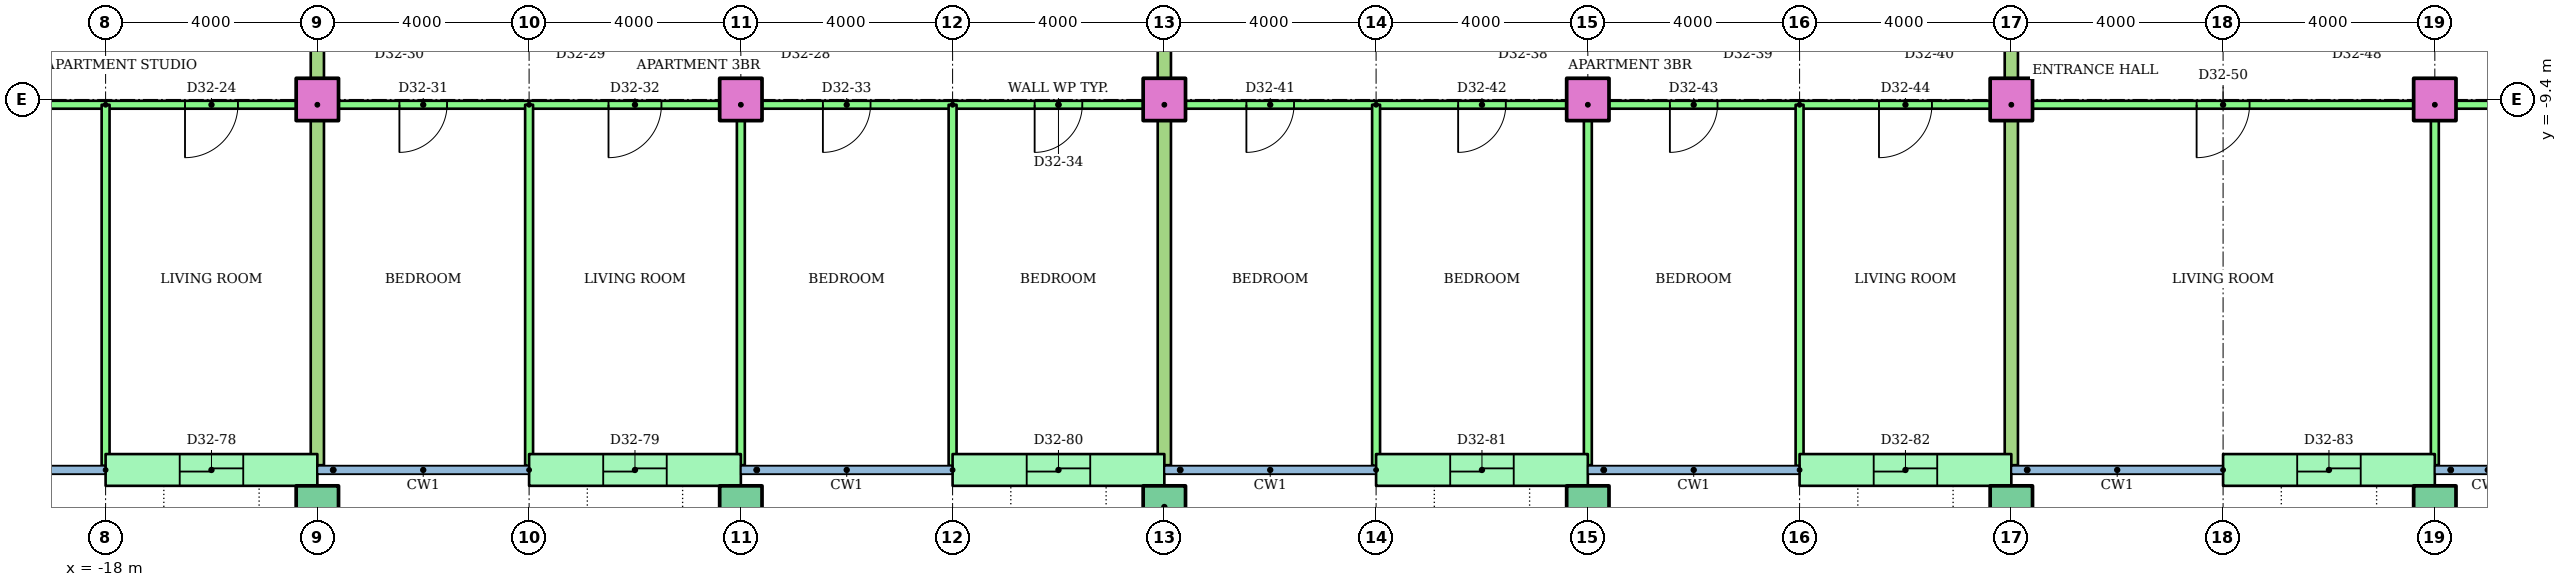
"""IFC4 building model, lengths in metres.
Left out: names, types, materials, properties, quantities, classifications, styles, units other than length and angle.
Written with IfcOpenShell. Run it as: python <this file> out.ifc"""

import sys

from ifc_helpers import new_model, si_unit, direction, frame, frame_2d, origin, origin_2d, place, context, subcontext, project, spatial, rectangle, hollow_rectangle, extrude, element, fill, save


model = new_model("IFC4")
c1 = context("Model", 3, precision=1e-05, world=origin(), true_north=direction((0.0, 1.0)))
c2 = subcontext(c1, "Body", "Model", "MODEL_VIEW")
j1 = project(units=[si_unit("LENGTHUNIT", "METRE"), si_unit("PLANEANGLEUNIT", "RADIAN")], contexts=[c1])
p1 = place(None, origin())
s1 = spatial("IfcSite", under=j1, at=p1, CompositionType="ELEMENT")
p2 = place(p1, origin())
s2 = spatial("IfcBuilding", under=s1, at=p2, CompositionType="ELEMENT")
p3 = place(p2, frame((0.0, 0.0, 126.2)))
s3 = spatial("IfcBuildingStorey", under=s2, at=p3, CompositionType="ELEMENT", Elevation=126.2)
for number, where in (
    (1, (-14.0, -17.1, 0.0)),
    (2, (-6.0, -17.1, 0.0)),
    (3, (2.0, -17.1, 0.0)),
    (4, (10.0, -17.1, 0.0)),
    (5, (18.0, -17.1, 0.0)),
    (6, (26.0, -17.1, 0.0)),
):
    element("IfcColumn", number, at=place(p3, frame(where)), inside=s3, PredefinedType="COLUMN", context=c2, shape_type="SweptSolid", body=[
        extrude(hollow_rectangle(XDim=0.8, YDim=0.8, WallThickness=0.04, at=origin_2d()), origin(), (0.0, 0.0, 1.0), 3.2),
    ])
for number, where in (
    (7, (-14.0, -9.4, 0.0)),
    (8, (-6.0, -9.4, 0.0)),
    (9, (2.0, -9.4, 0.0)),
    (10, (10.0, -9.4, 0.0)),
    (11, (18.0, -9.4, 0.0)),
    (12, (26.0, -9.4, 0.0)),
):
    element("IfcColumn", number, at=place(p3, frame(where)), inside=s3, PredefinedType="COLUMN", context=c2, shape_type="SweptSolid", body=[
        extrude(rectangle(XDim=0.8, YDim=0.8, at=origin_2d()), origin(), (0.0, 0.0, 1.0), 3.2),
    ])
p4 = place(p3, frame((-18.0, -16.4, 0.0)))
e13 = element("IfcWall", 13, at=p4, inside=s3, PredefinedType="STANDARD", context=c2, shape_type="SweptSolid", body=[
    extrude(rectangle(XDim=4.0, YDim=0.6, at=frame_2d((2.0, 0.0))), origin(), (0.0, 0.0, 1.0), 2.92),
])
p5 = place(p4, frame((1.4, 0.0, 0.0)))
e14 = element("IfcOpeningElement", 14, at=p5, cuts=e13, PredefinedType="OPENING", context=c2, shape_type="SweptSolid", body=[
    extrude(rectangle(XDim=1.2, YDim=2.1, at=frame_2d((0.6, 1.05))), frame((0.0, 0.31, 0.0), z_axis=(0.0, -1.0, 0.0), x_axis=(1.0, 0.0, 0.0)), (0.0, 0.0, 1.0), 0.62),
])
p6 = place(p3, frame((-10.0, -16.4, 0.0)))
e15 = element("IfcWall", 15, at=p6, inside=s3, PredefinedType="STANDARD", context=c2, shape_type="SweptSolid", body=[
    extrude(rectangle(XDim=4.0, YDim=0.6, at=frame_2d((2.0, 0.0))), origin(), (0.0, 0.0, 1.0), 2.92),
])
p7 = place(p6, frame((1.4, 0.0, 0.0)))
e16 = element("IfcOpeningElement", 16, at=p7, cuts=e15, PredefinedType="OPENING", context=c2, shape_type="SweptSolid", body=[
    extrude(rectangle(XDim=1.2, YDim=2.1, at=frame_2d((0.6, 1.05))), frame((0.0, 0.31, 0.0), z_axis=(0.0, -1.0, 0.0), x_axis=(1.0, 0.0, 0.0)), (0.0, 0.0, 1.0), 0.62),
])
p8 = place(p3, frame((-2.0, -16.4, 0.0)))
e17 = element("IfcWall", 17, at=p8, inside=s3, PredefinedType="STANDARD", context=c2, shape_type="SweptSolid", body=[
    extrude(rectangle(XDim=4.0, YDim=0.6, at=frame_2d((2.0, 0.0))), origin(), (0.0, 0.0, 1.0), 2.92),
])
p9 = place(p8, frame((1.4, 0.0, 0.0)))
e18 = element("IfcOpeningElement", 18, at=p9, cuts=e17, PredefinedType="OPENING", context=c2, shape_type="SweptSolid", body=[
    extrude(rectangle(XDim=1.2, YDim=2.1, at=frame_2d((0.6, 1.05))), frame((0.0, 0.31, 0.0), z_axis=(0.0, -1.0, 0.0), x_axis=(1.0, 0.0, 0.0)), (0.0, 0.0, 1.0), 0.62),
])
p10 = place(p3, frame((6.0, -16.4, 0.0)))
e19 = element("IfcWall", 19, at=p10, inside=s3, PredefinedType="STANDARD", context=c2, shape_type="SweptSolid", body=[
    extrude(rectangle(XDim=4.0, YDim=0.6, at=frame_2d((2.0, 0.0))), origin(), (0.0, 0.0, 1.0), 2.92),
])
p11 = place(p10, frame((1.4, 0.0, 0.0)))
e20 = element("IfcOpeningElement", 20, at=p11, cuts=e19, PredefinedType="OPENING", context=c2, shape_type="SweptSolid", body=[
    extrude(rectangle(XDim=1.2, YDim=2.1, at=frame_2d((0.6, 1.05))), frame((0.0, 0.31, 0.0), z_axis=(0.0, -1.0, 0.0), x_axis=(1.0, 0.0, 0.0)), (0.0, 0.0, 1.0), 0.62),
])
p12 = place(p3, frame((14.0, -16.4, 0.0)))
e21 = element("IfcWall", 21, at=p12, inside=s3, PredefinedType="STANDARD", context=c2, shape_type="SweptSolid", body=[
    extrude(rectangle(XDim=4.0, YDim=0.6, at=frame_2d((2.0, 0.0))), origin(), (0.0, 0.0, 1.0), 2.92),
])
p13 = place(p12, frame((1.4, 0.0, 0.0)))
e22 = element("IfcOpeningElement", 22, at=p13, cuts=e21, PredefinedType="OPENING", context=c2, shape_type="SweptSolid", body=[
    extrude(rectangle(XDim=1.2, YDim=2.1, at=frame_2d((0.6, 1.05))), frame((0.0, 0.31, 0.0), z_axis=(0.0, -1.0, 0.0), x_axis=(1.0, 0.0, 0.0)), (0.0, 0.0, 1.0), 0.62),
])
p14 = place(p3, frame((22.0, -16.4, 0.0)))
e23 = element("IfcWall", 23, at=p14, inside=s3, PredefinedType="STANDARD", context=c2, shape_type="SweptSolid", body=[
    extrude(rectangle(XDim=4.0, YDim=0.6, at=frame_2d((2.0, 0.0))), origin(), (0.0, 0.0, 1.0), 2.92),
])
p15 = place(p14, frame((1.4, 0.0, 0.0)))
e24 = element("IfcOpeningElement", 24, at=p15, cuts=e23, PredefinedType="OPENING", context=c2, shape_type="SweptSolid", body=[
    extrude(rectangle(XDim=1.2, YDim=2.1, at=frame_2d((0.6, 1.05))), frame((0.0, 0.31, 0.0), z_axis=(0.0, -1.0, 0.0), x_axis=(1.0, 0.0, 0.0)), (0.0, 0.0, 1.0), 0.62),
])
p16 = place(p3, frame((-14.0, -9.5, 0.0), z_axis=(0.0, 0.0, 1.0), x_axis=(-1.0, 0.0, 0.0)))
e25 = element("IfcWall", 25, at=p16, inside=s3, PredefinedType="PARTITIONING", context=c2, shape_type="SweptSolid", body=[
    extrude(rectangle(XDim=8.0, YDim=0.15, at=frame_2d((4.0, 0.0))), origin(), (0.0, 0.0, 1.0), 2.4),
])
p17 = place(p16, frame((5.5, 0.0, 0.0)))
e26 = element("IfcOpeningElement", 26, at=p17, cuts=e25, PredefinedType="OPENING", context=c2, shape_type="SweptSolid", body=[
    extrude(rectangle(XDim=1.0, YDim=2.1, at=frame_2d((0.5, 1.05))), frame((0.0, 0.085, 0.0), z_axis=(0.0, -1.0, 0.0), x_axis=(1.0, 0.0, 0.0)), (0.0, 0.0, 1.0), 0.17),
])
p18 = place(p16, frame((1.5, 0.0, 0.0)))
e27 = element("IfcOpeningElement", 27, at=p18, cuts=e25, PredefinedType="OPENING", context=c2, shape_type="SweptSolid", body=[
    extrude(rectangle(XDim=1.0, YDim=2.1, at=frame_2d((0.5, 1.05))), frame((0.0, 0.085, 0.0), z_axis=(0.0, -1.0, 0.0), x_axis=(1.0, 0.0, 0.0)), (0.0, 0.0, 1.0), 0.17),
])
p19 = place(p3, frame((-18.0, -9.5, 0.0), z_axis=(0.0, 0.0, 1.0), x_axis=(0.0, -1.0, 0.0)))
e28 = element("IfcWall", 28, at=p19, inside=s3, PredefinedType="PARTITIONING", context=c2, shape_type="SweptSolid", body=[
    extrude(rectangle(XDim=6.821, YDim=0.15, at=frame_2d((3.411, 0.0))), origin(), (0.0, 0.0, 1.0), 2.4),
])
p20 = place(p3, frame((2.0, -9.5, 0.0), z_axis=(0.0, 0.0, 1.0), x_axis=(-1.0, 0.0, 0.0)))
e29 = element("IfcWall", 29, at=p20, inside=s3, PredefinedType="PARTITIONING", context=c2, shape_type="SweptSolid", body=[
    extrude(rectangle(XDim=16.0, YDim=0.15, at=frame_2d((8.0, 0.0))), origin(), (0.0, 0.0, 1.0), 2.4),
])
p21 = place(p20, frame((13.55, 0.0, 0.0)))
e30 = element("IfcOpeningElement", 30, at=p21, cuts=e29, PredefinedType="OPENING", context=c2, shape_type="SweptSolid", body=[
    extrude(rectangle(XDim=0.9, YDim=2.1, at=frame_2d((0.45, 1.05))), frame((0.0, 0.085, 0.0), z_axis=(0.0, -1.0, 0.0), x_axis=(1.0, 0.0, 0.0)), (0.0, 0.0, 1.0), 0.17),
])
p22 = place(p20, frame((9.5, 0.0, 0.0)))
e31 = element("IfcOpeningElement", 31, at=p22, cuts=e29, PredefinedType="OPENING", context=c2, shape_type="SweptSolid", body=[
    extrude(rectangle(XDim=1.0, YDim=2.1, at=frame_2d((0.5, 1.05))), frame((0.0, 0.085, 0.0), z_axis=(0.0, -1.0, 0.0), x_axis=(1.0, 0.0, 0.0)), (0.0, 0.0, 1.0), 0.17),
])
p23 = place(p20, frame((5.55, 0.0, 0.0)))
e32 = element("IfcOpeningElement", 32, at=p23, cuts=e29, PredefinedType="OPENING", context=c2, shape_type="SweptSolid", body=[
    extrude(rectangle(XDim=0.9, YDim=2.1, at=frame_2d((0.45, 1.05))), frame((0.0, 0.085, 0.0), z_axis=(0.0, -1.0, 0.0), x_axis=(1.0, 0.0, 0.0)), (0.0, 0.0, 1.0), 0.17),
])
p24 = place(p20, frame((1.55, 0.0, 0.0)))
e33 = element("IfcOpeningElement", 33, at=p24, cuts=e29, PredefinedType="OPENING", context=c2, shape_type="SweptSolid", body=[
    extrude(rectangle(XDim=0.9, YDim=2.1, at=frame_2d((0.45, 1.05))), frame((0.0, 0.085, 0.0), z_axis=(0.0, -1.0, 0.0), x_axis=(1.0, 0.0, 0.0)), (0.0, 0.0, 1.0), 0.17),
])
p25 = place(p3, frame((-10.0, -9.5, 0.0), z_axis=(0.0, 0.0, 1.0), x_axis=(0.0, -1.0, 0.0)))
e34 = element("IfcWall", 34, at=p25, inside=s3, PredefinedType="PARTITIONING", context=c2, shape_type="SweptSolid", body=[
    extrude(rectangle(XDim=6.821, YDim=0.15, at=frame_2d((3.411, 0.0))), origin(), (0.0, 0.0, 1.0), 2.4),
])
p26 = place(p3, frame((-6.0, -9.5, 0.0), z_axis=(0.0, 0.0, 1.0), x_axis=(0.0, -1.0, 0.0)))
e35 = element("IfcWall", 35, at=p26, inside=s3, PredefinedType="PARTITIONING", context=c2, shape_type="SweptSolid", body=[
    extrude(rectangle(XDim=6.81, YDim=0.15, at=frame_2d((3.405, 0.0))), origin(), (0.0, 0.0, 1.0), 2.4),
])
p27 = place(p3, frame((-2.0, -9.5, 0.0), z_axis=(0.0, 0.0, 1.0), x_axis=(0.0, -1.0, 0.0)))
e36 = element("IfcWall", 36, at=p27, inside=s3, PredefinedType="PARTITIONING", context=c2, shape_type="SweptSolid", body=[
    extrude(rectangle(XDim=6.821, YDim=0.15, at=frame_2d((3.411, 0.0))), origin(), (0.0, 0.0, 1.0), 2.4),
])
p28 = place(p3, frame((-14.0, -1.4, 0.0), z_axis=(0.0, 0.0, 1.0), x_axis=(0.0, -1.0, 0.0)))
e37 = element("IfcWall", 37, at=p28, inside=s3, PredefinedType="PARTITIONING", context=c2, shape_type="SweptSolid", body=[
    extrude(rectangle(XDim=14.91, YDim=0.25, at=frame_2d((7.455, 0.0))), origin(), (0.0, 0.0, 1.0), 2.4),
])
p29 = place(p3, frame((18.0, -9.5, 0.0), z_axis=(0.0, 0.0, 1.0), x_axis=(-1.0, 0.0, 0.0)))
e38 = element("IfcWall", 38, at=p29, inside=s3, PredefinedType="PARTITIONING", context=c2, shape_type="SweptSolid", body=[
    extrude(rectangle(XDim=16.0, YDim=0.15, at=frame_2d((8.0, 0.0))), origin(), (0.0, 0.0, 1.0), 2.4),
])
p30 = place(p29, frame((13.55, 0.0, 0.0)))
e39 = element("IfcOpeningElement", 39, at=p30, cuts=e38, PredefinedType="OPENING", context=c2, shape_type="SweptSolid", body=[
    extrude(rectangle(XDim=0.9, YDim=2.1, at=frame_2d((0.45, 1.05))), frame((0.0, 0.085, 0.0), z_axis=(0.0, -1.0, 0.0), x_axis=(1.0, 0.0, 0.0)), (0.0, 0.0, 1.0), 0.17),
])
p31 = place(p29, frame((9.55, 0.0, 0.0)))
e40 = element("IfcOpeningElement", 40, at=p31, cuts=e38, PredefinedType="OPENING", context=c2, shape_type="SweptSolid", body=[
    extrude(rectangle(XDim=0.9, YDim=2.1, at=frame_2d((0.45, 1.05))), frame((0.0, 0.085, 0.0), z_axis=(0.0, -1.0, 0.0), x_axis=(1.0, 0.0, 0.0)), (0.0, 0.0, 1.0), 0.17),
])
p32 = place(p29, frame((5.55, 0.0, 0.0)))
e41 = element("IfcOpeningElement", 41, at=p32, cuts=e38, PredefinedType="OPENING", context=c2, shape_type="SweptSolid", body=[
    extrude(rectangle(XDim=0.9, YDim=2.1, at=frame_2d((0.45, 1.05))), frame((0.0, 0.085, 0.0), z_axis=(0.0, -1.0, 0.0), x_axis=(1.0, 0.0, 0.0)), (0.0, 0.0, 1.0), 0.17),
])
p33 = place(p29, frame((1.5, 0.0, 0.0)))
e42 = element("IfcOpeningElement", 42, at=p33, cuts=e38, PredefinedType="OPENING", context=c2, shape_type="SweptSolid", body=[
    extrude(rectangle(XDim=1.0, YDim=2.1, at=frame_2d((0.5, 1.05))), frame((0.0, 0.085, 0.0), z_axis=(0.0, -1.0, 0.0), x_axis=(1.0, 0.0, 0.0)), (0.0, 0.0, 1.0), 0.17),
])
p34 = place(p3, frame((6.0, -9.5, 0.0), z_axis=(0.0, 0.0, 1.0), x_axis=(0.0, -1.0, 0.0)))
e43 = element("IfcWall", 43, at=p34, inside=s3, PredefinedType="PARTITIONING", context=c2, shape_type="SweptSolid", body=[
    extrude(rectangle(XDim=6.821, YDim=0.15, at=frame_2d((3.411, 0.0))), origin(), (0.0, 0.0, 1.0), 2.4),
])
p35 = place(p3, frame((10.0, -9.5, 0.0), z_axis=(0.0, 0.0, 1.0), x_axis=(0.0, -1.0, 0.0)))
e44 = element("IfcWall", 44, at=p35, inside=s3, PredefinedType="PARTITIONING", context=c2, shape_type="SweptSolid", body=[
    extrude(rectangle(XDim=6.81, YDim=0.15, at=frame_2d((3.405, 0.0))), origin(), (0.0, 0.0, 1.0), 2.4),
])
p36 = place(p3, frame((14.0, -9.5, 0.0), z_axis=(0.0, 0.0, 1.0), x_axis=(0.0, -1.0, 0.0)))
e45 = element("IfcWall", 45, at=p36, inside=s3, PredefinedType="PARTITIONING", context=c2, shape_type="SweptSolid", body=[
    extrude(rectangle(XDim=6.821, YDim=0.15, at=frame_2d((3.411, 0.0))), origin(), (0.0, 0.0, 1.0), 2.4),
])
p37 = place(p3, frame((2.0, -1.4, 0.0), z_axis=(0.0, 0.0, 1.0), x_axis=(0.0, -1.0, 0.0)))
e46 = element("IfcWall", 46, at=p37, inside=s3, PredefinedType="PARTITIONING", context=c2, shape_type="SweptSolid", body=[
    extrude(rectangle(XDim=14.91, YDim=0.25, at=frame_2d((7.455, 0.0))), origin(), (0.0, 0.0, 1.0), 2.4),
])
p38 = place(p3, frame((32.72, -9.5, 0.0), z_axis=(0.0, 0.0, 1.0), x_axis=(-1.0, 0.0, 0.0)))
e47 = element("IfcWall", 47, at=p38, inside=s3, PredefinedType="PARTITIONING", context=c2, shape_type="SweptSolid", body=[
    extrude(rectangle(XDim=14.72, YDim=0.15, at=frame_2d((7.36, 0.0))), origin(), (0.0, 0.0, 1.0), 2.4),
])
p39 = place(p38, frame((10.22, 0.0, 0.0)))
e48 = element("IfcOpeningElement", 48, at=p39, cuts=e47, PredefinedType="OPENING", context=c2, shape_type="SweptSolid", body=[
    extrude(rectangle(XDim=1.0, YDim=2.1, at=frame_2d((0.5, 1.05))), frame((0.0, 0.085, 0.0), z_axis=(0.0, -1.0, 0.0), x_axis=(1.0, 0.0, 0.0)), (0.0, 0.0, 1.0), 0.17),
])
p40 = place(p38, frame((3.02, 0.0, 0.0)))
e49 = element("IfcOpeningElement", 49, at=p40, cuts=e47, PredefinedType="OPENING", context=c2, shape_type="SweptSolid", body=[
    extrude(rectangle(XDim=0.9, YDim=2.1, at=frame_2d((0.45, 1.05))), frame((0.0, 0.085, 0.0), z_axis=(0.0, -1.0, 0.0), x_axis=(1.0, 0.0, 0.0)), (0.0, 0.0, 1.0), 0.17),
])
p41 = place(p3, frame((26.0, -9.5, 0.0), z_axis=(0.0, 0.0, 1.0), x_axis=(0.0, -1.0, 0.0)))
e50 = element("IfcWall", 50, at=p41, inside=s3, PredefinedType="PARTITIONING", context=c2, shape_type="SweptSolid", body=[
    extrude(rectangle(XDim=6.81, YDim=0.15, at=frame_2d((3.405, 0.0))), origin(), (0.0, 0.0, 1.0), 2.4),
])
p42 = place(p3, frame((18.0, -1.4, 0.0), z_axis=(0.0, 0.0, 1.0), x_axis=(0.0, -1.0, 0.0)))
e51 = element("IfcWall", 51, at=p42, inside=s3, PredefinedType="PARTITIONING", context=c2, shape_type="SweptSolid", body=[
    extrude(rectangle(XDim=14.91, YDim=0.25, at=frame_2d((7.455, 0.0))), origin(), (0.0, 0.0, 1.0), 2.4),
])
p43 = place(p18, origin())
e52 = element("IfcDoor", 52, at=p43, inside=s3, OperationType="SINGLE_SWING_RIGHT", PredefinedType="DOOR", context=c2, shape_type="SweptSolid", body=[
    extrude(rectangle(XDim=1.0, YDim=2.1, at=frame_2d((0.5, 1.05))), frame((0.0, 0.025, 0.0), z_axis=(0.0, -1.0, 0.0), x_axis=(1.0, 0.0, 0.0)), (0.0, 0.0, 1.0), 0.05),
])
fill(e27, e52)
p44 = place(p21, origin())
e53 = element("IfcDoor", 53, at=p44, inside=s3, OperationType="SINGLE_SWING_RIGHT", PredefinedType="DOOR", context=c2, shape_type="SweptSolid", body=[
    extrude(rectangle(XDim=0.9, YDim=2.1, at=frame_2d((0.45, 1.05))), frame((0.0, 0.025, 0.0), z_axis=(0.0, -1.0, 0.0), x_axis=(1.0, 0.0, 0.0)), (0.0, 0.0, 1.0), 0.05),
])
fill(e30, e53)
p45 = place(p22, origin())
e54 = element("IfcDoor", 54, at=p45, inside=s3, OperationType="SINGLE_SWING_RIGHT", PredefinedType="DOOR", context=c2, shape_type="SweptSolid", body=[
    extrude(rectangle(XDim=1.0, YDim=2.1, at=frame_2d((0.5, 1.05))), frame((0.0, 0.025, 0.0), z_axis=(0.0, -1.0, 0.0), x_axis=(1.0, 0.0, 0.0)), (0.0, 0.0, 1.0), 0.05),
])
fill(e31, e54)
p46 = place(p23, origin())
e55 = element("IfcDoor", 55, at=p46, inside=s3, OperationType="SINGLE_SWING_RIGHT", PredefinedType="DOOR", context=c2, shape_type="SweptSolid", body=[
    extrude(rectangle(XDim=0.9, YDim=2.1, at=frame_2d((0.45, 1.05))), frame((0.0, 0.025, 0.0), z_axis=(0.0, -1.0, 0.0), x_axis=(1.0, 0.0, 0.0)), (0.0, 0.0, 1.0), 0.05),
])
fill(e32, e55)
p47 = place(p24, origin())
e56 = element("IfcDoor", 56, at=p47, inside=s3, OperationType="SINGLE_SWING_RIGHT", PredefinedType="DOOR", context=c2, shape_type="SweptSolid", body=[
    extrude(rectangle(XDim=0.9, YDim=2.1, at=frame_2d((0.45, 1.05))), frame((0.0, 0.025, 0.0), z_axis=(0.0, -1.0, 0.0), x_axis=(1.0, 0.0, 0.0)), (0.0, 0.0, 1.0), 0.05),
])
fill(e33, e56)
p48 = place(p30, origin())
e57 = element("IfcDoor", 57, at=p48, inside=s3, OperationType="SINGLE_SWING_RIGHT", PredefinedType="DOOR", context=c2, shape_type="SweptSolid", body=[
    extrude(rectangle(XDim=0.9, YDim=2.1, at=frame_2d((0.45, 1.05))), frame((0.0, 0.025, 0.0), z_axis=(0.0, -1.0, 0.0), x_axis=(1.0, 0.0, 0.0)), (0.0, 0.0, 1.0), 0.05),
])
fill(e39, e57)
p49 = place(p31, origin())
e58 = element("IfcDoor", 58, at=p49, inside=s3, OperationType="SINGLE_SWING_RIGHT", PredefinedType="DOOR", context=c2, shape_type="SweptSolid", body=[
    extrude(rectangle(XDim=0.9, YDim=2.1, at=frame_2d((0.45, 1.05))), frame((0.0, 0.025, 0.0), z_axis=(0.0, -1.0, 0.0), x_axis=(1.0, 0.0, 0.0)), (0.0, 0.0, 1.0), 0.05),
])
fill(e40, e58)
p50 = place(p32, origin())
e59 = element("IfcDoor", 59, at=p50, inside=s3, OperationType="SINGLE_SWING_RIGHT", PredefinedType="DOOR", context=c2, shape_type="SweptSolid", body=[
    extrude(rectangle(XDim=0.9, YDim=2.1, at=frame_2d((0.45, 1.05))), frame((0.0, 0.025, 0.0), z_axis=(0.0, -1.0, 0.0), x_axis=(1.0, 0.0, 0.0)), (0.0, 0.0, 1.0), 0.05),
])
fill(e41, e59)
p51 = place(p33, origin())
e60 = element("IfcDoor", 60, at=p51, inside=s3, OperationType="SINGLE_SWING_RIGHT", PredefinedType="DOOR", context=c2, shape_type="SweptSolid", body=[
    extrude(rectangle(XDim=1.0, YDim=2.1, at=frame_2d((0.5, 1.05))), frame((0.0, 0.025, 0.0), z_axis=(0.0, -1.0, 0.0), x_axis=(1.0, 0.0, 0.0)), (0.0, 0.0, 1.0), 0.05),
])
fill(e42, e60)
p52 = place(p39, origin())
e61 = element("IfcDoor", 61, at=p52, inside=s3, OperationType="SINGLE_SWING_RIGHT", PredefinedType="DOOR", context=c2, shape_type="SweptSolid", body=[
    extrude(rectangle(XDim=1.0, YDim=2.1, at=frame_2d((0.5, 1.05))), frame((0.0, 0.025, 0.0), z_axis=(0.0, -1.0, 0.0), x_axis=(1.0, 0.0, 0.0)), (0.0, 0.0, 1.0), 0.05),
])
fill(e48, e61)
p53 = place(p5, origin())
e62 = element("IfcDoor", 62, at=p53, inside=s3, OperationType="SLIDING_TO_LEFT", PredefinedType="DOOR", context=c2, shape_type="SweptSolid", body=[
    extrude(rectangle(XDim=1.2, YDim=2.1, at=frame_2d((0.6, 1.05))), frame((0.0, 0.025, 0.0), z_axis=(0.0, -1.0, 0.0), x_axis=(1.0, 0.0, 0.0)), (0.0, 0.0, 1.0), 0.05),
])
fill(e14, e62)
p54 = place(p7, origin())
e63 = element("IfcDoor", 63, at=p54, inside=s3, OperationType="SLIDING_TO_LEFT", PredefinedType="DOOR", context=c2, shape_type="SweptSolid", body=[
    extrude(rectangle(XDim=1.2, YDim=2.1, at=frame_2d((0.6, 1.05))), frame((0.0, 0.025, 0.0), z_axis=(0.0, -1.0, 0.0), x_axis=(1.0, 0.0, 0.0)), (0.0, 0.0, 1.0), 0.05),
])
fill(e16, e63)
p55 = place(p9, origin())
e64 = element("IfcDoor", 64, at=p55, inside=s3, OperationType="SLIDING_TO_LEFT", PredefinedType="DOOR", context=c2, shape_type="SweptSolid", body=[
    extrude(rectangle(XDim=1.2, YDim=2.1, at=frame_2d((0.6, 1.05))), frame((0.0, 0.025, 0.0), z_axis=(0.0, -1.0, 0.0), x_axis=(1.0, 0.0, 0.0)), (0.0, 0.0, 1.0), 0.05),
])
fill(e18, e64)
p56 = place(p11, origin())
e65 = element("IfcDoor", 65, at=p56, inside=s3, OperationType="SLIDING_TO_LEFT", PredefinedType="DOOR", context=c2, shape_type="SweptSolid", body=[
    extrude(rectangle(XDim=1.2, YDim=2.1, at=frame_2d((0.6, 1.05))), frame((0.0, 0.025, 0.0), z_axis=(0.0, -1.0, 0.0), x_axis=(1.0, 0.0, 0.0)), (0.0, 0.0, 1.0), 0.05),
])
fill(e20, e65)
p57 = place(p13, origin())
e66 = element("IfcDoor", 66, at=p57, inside=s3, OperationType="SLIDING_TO_LEFT", PredefinedType="DOOR", context=c2, shape_type="SweptSolid", body=[
    extrude(rectangle(XDim=1.2, YDim=2.1, at=frame_2d((0.6, 1.05))), frame((0.0, 0.025, 0.0), z_axis=(0.0, -1.0, 0.0), x_axis=(1.0, 0.0, 0.0)), (0.0, 0.0, 1.0), 0.05),
])
fill(e22, e66)
p58 = place(p15, origin())
e67 = element("IfcDoor", 67, at=p58, inside=s3, OperationType="SLIDING_TO_LEFT", PredefinedType="DOOR", context=c2, shape_type="SweptSolid", body=[
    extrude(rectangle(XDim=1.2, YDim=2.1, at=frame_2d((0.6, 1.05))), frame((0.0, 0.025, 0.0), z_axis=(0.0, -1.0, 0.0), x_axis=(1.0, 0.0, 0.0)), (0.0, 0.0, 1.0), 0.05),
])
fill(e24, e67)
save(model, sys.argv[1])
